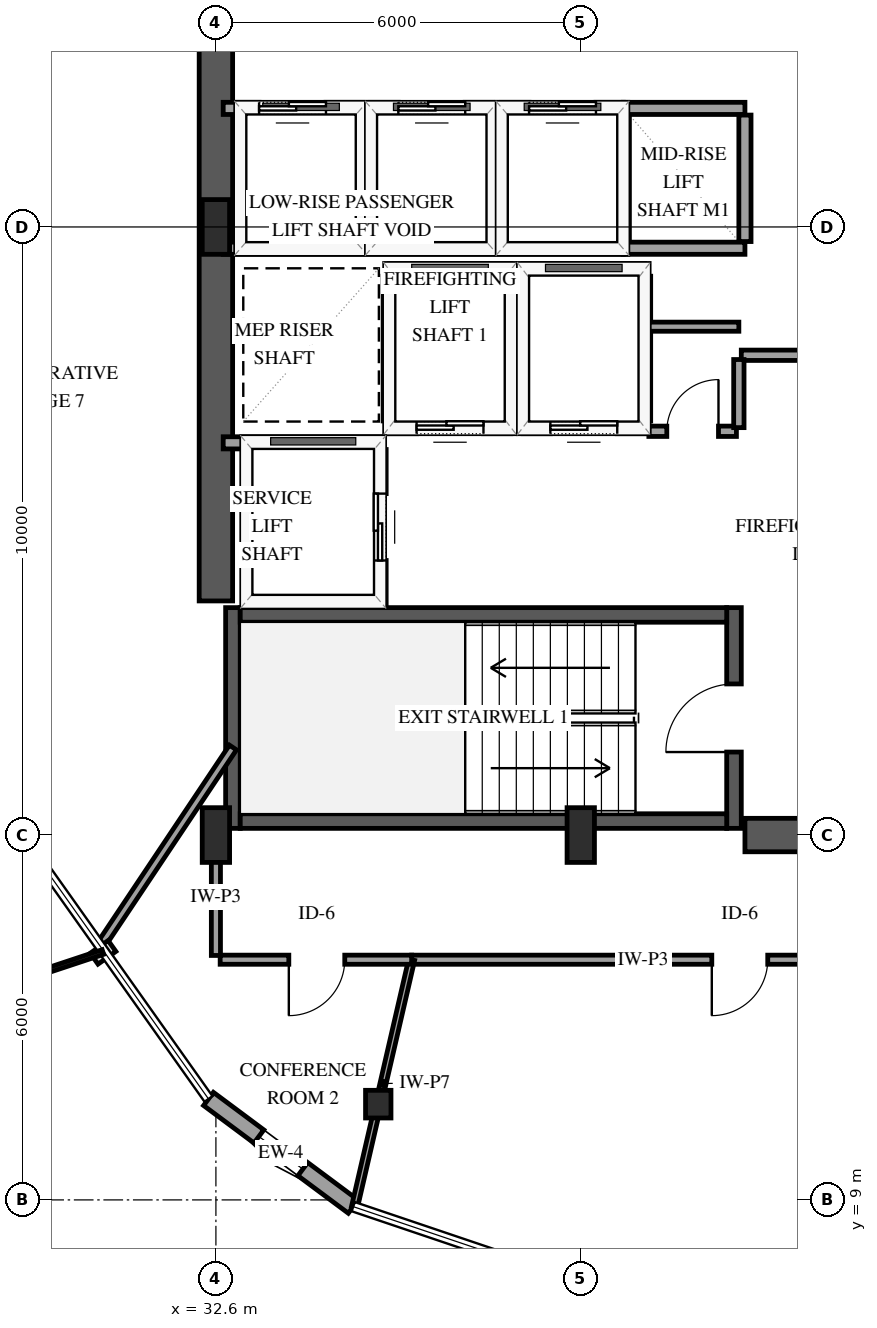
"""IFC4 building model, lengths in metres.
Left out: names, types, materials, properties, quantities, classifications, styles, units other than length and angle.
Written with IfcOpenShell. Run it as: python <this file> out.ifc"""

import sys

from ifc_helpers import new_model, si_unit, direction, frame, frame_2d, origin, origin_2d, place, context, subcontext, project, spatial, rectangle, i_section, extrude, element, fill, save


model = new_model("IFC4")
c1 = context("Model", 3, precision=1e-05, world=origin(), true_north=direction((0.0, 1.0)))
c2 = subcontext(c1, "Body", "Model", "MODEL_VIEW")
j1 = project(units=[si_unit("LENGTHUNIT", "METRE"), si_unit("PLANEANGLEUNIT", "RADIAN")], contexts=[c1])
p1 = place(None, origin())
s1 = spatial("IfcSite", under=j1, at=p1, CompositionType="ELEMENT")
p2 = place(p1, origin())
s2 = spatial("IfcBuilding", under=s1, at=p2, CompositionType="ELEMENT")
p3 = place(p2, frame((0.0, 0.0, 95.2)))
s3 = spatial("IfcBuildingStorey", under=s2, at=p3, CompositionType="ELEMENT", Elevation=95.2)
p4 = place(p3, frame((32.88, 15.11, 0.0), z_axis=(0.0, 0.0, 1.0), x_axis=(0.0, 1.0, 0.0)))
e1 = element("IfcWall", 1, at=p4, inside=s3, PredefinedType="SHEAR", context=c2, shape_type="SweptSolid", body=[
    extrude(rectangle(XDim=3.63, YDim=0.24, at=frame_2d((1.815, 0.0))), origin(), (0.0, 0.0, 1.0), 3.9),
])
p5 = place(p3, frame((41.12, 15.11, 0.0), z_axis=(0.0, 0.0, 1.0), x_axis=(0.0, 1.0, 0.0)))
e2 = element("IfcWall", 2, at=p5, inside=s3, PredefinedType="SHEAR", context=c2, shape_type="SweptSolid", body=[
    extrude(rectangle(XDim=3.63, YDim=0.24, at=frame_2d((1.815, 0.0))), origin(), (0.0, 0.0, 1.0), 3.9),
])
p6 = place(p5, frame((1.255, 0.0, 0.0)))
e3 = element("IfcOpeningElement", 3, at=p6, cuts=e2, PredefinedType="OPENING", context=c2, shape_type="SweptSolid", body=[
    extrude(rectangle(XDim=1.12, YDim=2.15, at=frame_2d((0.56, 1.075))), frame((0.0, 0.13, 0.0), z_axis=(0.0, -1.0, 0.0), x_axis=(1.0, 0.0, 0.0)), (0.0, 0.0, 1.0), 0.26),
])
for number, where, z_axis, x_axis in (
    (4, (33.0, 15.23, 0.0), (0.0, 0.0, 1.0), (1.0, 0.0, 0.0)),
    (5, (33.0, 18.62, 0.0), (0.0, 0.0, 1.0), (1.0, 0.0, 0.0)),
):
    element("IfcWall", number, at=place(p3, frame(where, z_axis=z_axis, x_axis=x_axis)), inside=s3, PredefinedType="SHEAR", context=c2, shape_type="SweptSolid", body=[
        extrude(rectangle(XDim=8.0, YDim=0.24, at=frame_2d((4.0, 0.0))), origin(), (0.0, 0.0, 1.0), 3.9),
    ])
p7 = place(p3, frame((32.6, 18.85, 0.0), z_axis=(0.0, 0.0, 1.0), x_axis=(0.0, 1.0, 0.0)))
e6 = element("IfcWall", 6, at=p7, inside=s3, PredefinedType="SHEAR", context=c2, shape_type="SweptSolid", body=[
    extrude(rectangle(XDim=12.3, YDim=0.55, at=frame_2d((6.15, 0.0))), origin(), (0.0, 0.0, 1.0), 3.9),
])
p8 = place(p3, frame((41.3, 15.0, 0.0), z_axis=(0.0, 0.0, 1.0), x_axis=(1.0, 0.0, 0.0)))
e7 = element("IfcWall", 7, at=p8, inside=s3, PredefinedType="SHEAR", context=c2, shape_type="SweptSolid", body=[
    extrude(rectangle(XDim=2.85, YDim=0.55, at=frame_2d((1.425, 0.0))), origin(), (0.0, 0.0, 1.0), 3.9),
])
for number, where, z_axis, x_axis in (
    (8, (32.6, 15.0, 0.0), (0.0, 0.0, 1.0), (1.0, 0.0, 0.0)),
    (9, (32.6, 25.0, 0.0), (0.0, 0.0, 1.0), (1.0, 0.0, 0.0)),
    (10, (38.6, 15.0, 0.0), (0.0, 0.0, 1.0), (1.0, 0.0, 0.0)),
):
    element("IfcColumn", number, at=place(p3, frame(where, z_axis=z_axis, x_axis=x_axis)), inside=s3, PredefinedType="PILASTER", context=c2, shape_type="SweptSolid", body=[
        extrude(rectangle(XDim=0.45, YDim=0.9, at=origin_2d()), origin(), (0.0, 0.0, 1.0), 3.9),
    ])
p9 = place(p3, frame((35.27, 10.575, 0.0), z_axis=(0.0, 0.0, 1.0), x_axis=(1.0, 0.0, 0.0)))
e11 = element("IfcColumn", 11, at=p9, inside=s3, PredefinedType="COLUMN", context=c2, shape_type="SweptSolid", body=[
    extrude(i_section(OverallWidth=0.418, OverallDepth=0.455, WebThickness=0.042, FlangeThickness=0.068, FilletRadius=0.038, at=origin_2d()), origin(), (0.0, 0.0, 1.0), 3.9),
])
p10 = place(p3, frame((32.478, 10.66, 0.0), z_axis=(0.0, 0.0, 1.0), x_axis=(0.802216720069, -0.597032942175, 0.0)))
e12 = element("IfcWall", 12, at=p10, inside=s3, PredefinedType="SOLIDWALL", context=c2, shape_type="SweptSolid", body=[
    extrude(rectangle(XDim=2.966, YDim=0.27, at=frame_2d((1.483, 0.0))), origin(), (0.0, 0.0, 1.0), 2.979),
])
p11 = place(p10, frame((1.033, 0.0, 0.75)))
e13 = element("IfcOpeningElement", 13, at=p11, cuts=e12, PredefinedType="OPENING", context=c2, shape_type="SweptSolid", body=[
    extrude(rectangle(XDim=0.9, YDim=1.5, at=frame_2d((0.45, 0.75))), frame((0.0, 0.145, 0.0), z_axis=(0.0, -1.0, 0.0), x_axis=(1.0, 0.0, 0.0)), (0.0, 0.0, 1.0), 0.29),
])
p12 = place(p3, frame((35.45, 21.7, 0.0), z_axis=(0.0, 0.0, 1.0), x_axis=(1.0, 0.0, 0.0)))
e14 = element("IfcWall", 14, at=p12, inside=s3, PredefinedType="SOLIDWALL", context=c2, shape_type="SweptSolid", body=[
    extrude(rectangle(XDim=2.0, YDim=0.2, at=frame_2d((1.0, 0.0))), origin(), (0.0, 0.0, 1.0), 3.6),
])
p13 = place(p12, frame((0.45, 0.0, 0.0)))
e15 = element("IfcOpeningElement", 15, at=p13, cuts=e14, PredefinedType="OPENING", context=c2, shape_type="SweptSolid", body=[
    extrude(rectangle(XDim=1.1, YDim=2.15, at=frame_2d((0.55, 1.075))), frame((0.0, 0.11, 0.0), z_axis=(0.0, -1.0, 0.0), x_axis=(1.0, 0.0, 0.0)), (0.0, 0.0, 1.0), 0.22),
])
p14 = place(p3, frame((35.45, 24.3, 0.0), z_axis=(0.0, 0.0, 1.0), x_axis=(1.0, 0.0, 0.0)))
e16 = element("IfcWall", 16, at=p14, inside=s3, PredefinedType="SOLIDWALL", context=c2, shape_type="SweptSolid", body=[
    extrude(rectangle(XDim=2.0, YDim=0.2, at=frame_2d((1.0, 0.0))), origin(), (0.0, 0.0, 1.0), 3.6),
])
for number, where, z_axis, x_axis in (
    (17, (35.45, 21.81, 0.0), (0.0, 0.0, 1.0), (0.0, 1.0, 0.0)),
    (18, (37.45, 21.81, 0.0), (0.0, 0.0, 1.0), (0.0, 1.0, 0.0)),
):
    element("IfcWall", number, at=place(p3, frame(where, z_axis=z_axis, x_axis=x_axis)), inside=s3, PredefinedType="SOLIDWALL", context=c2, shape_type="SweptSolid", body=[
        extrude(rectangle(XDim=2.38, YDim=0.2, at=frame_2d((1.19, 0.0))), origin(), (0.0, 0.0, 1.0), 3.6),
    ])
p15 = place(p3, frame((37.65, 21.7, 0.0), z_axis=(0.0, 0.0, 1.0), x_axis=(1.0, 0.0, 0.0)))
e19 = element("IfcWall", 19, at=p15, inside=s3, PredefinedType="SOLIDWALL", context=c2, shape_type="SweptSolid", body=[
    extrude(rectangle(XDim=2.0, YDim=0.2, at=frame_2d((1.0, 0.0))), origin(), (0.0, 0.0, 1.0), 3.6),
])
p16 = place(p15, frame((0.45, 0.0, 0.0)))
e20 = element("IfcOpeningElement", 20, at=p16, cuts=e19, PredefinedType="OPENING", context=c2, shape_type="SweptSolid", body=[
    extrude(rectangle(XDim=1.1, YDim=2.15, at=frame_2d((0.55, 1.075))), frame((0.0, 0.11, 0.0), z_axis=(0.0, -1.0, 0.0), x_axis=(1.0, 0.0, 0.0)), (0.0, 0.0, 1.0), 0.22),
])
p17 = place(p3, frame((37.65, 24.3, 0.0), z_axis=(0.0, 0.0, 1.0), x_axis=(1.0, 0.0, 0.0)))
e21 = element("IfcWall", 21, at=p17, inside=s3, PredefinedType="SOLIDWALL", context=c2, shape_type="SweptSolid", body=[
    extrude(rectangle(XDim=2.0, YDim=0.2, at=frame_2d((1.0, 0.0))), origin(), (0.0, 0.0, 1.0), 3.6),
])
p18 = place(p3, frame((39.65, 21.81, 0.0), z_axis=(0.0, 0.0, 1.0), x_axis=(0.0, 1.0, 0.0)))
e22 = element("IfcWall", 22, at=p18, inside=s3, PredefinedType="SOLIDWALL", context=c2, shape_type="SweptSolid", body=[
    extrude(rectangle(XDim=2.38, YDim=0.2, at=frame_2d((1.19, 0.0))), origin(), (0.0, 0.0, 1.0), 3.6),
])
p19 = place(p3, frame((32.72, 21.45, 0.0), z_axis=(0.0, 0.0, 1.0), x_axis=(1.0, 0.0, 0.0)))
e23 = element("IfcWall", 23, at=p19, inside=s3, PredefinedType="SOLIDWALL", context=c2, shape_type="SweptSolid", body=[
    extrude(rectangle(XDim=2.58, YDim=0.2, at=frame_2d((1.29, 0.0))), origin(), (0.0, 0.0, 1.0), 3.6),
])
p20 = place(p3, frame((35.3, 18.79, 0.0), z_axis=(0.0, 0.0, 1.0), x_axis=(0.0, 1.0, 0.0)))
e24 = element("IfcWall", 24, at=p20, inside=s3, PredefinedType="SOLIDWALL", context=c2, shape_type="SweptSolid", body=[
    extrude(rectangle(XDim=2.55, YDim=0.2, at=frame_2d((1.275, 0.0))), origin(), (0.0, 0.0, 1.0), 3.6),
])
p21 = place(p20, frame((0.725, 0.0, 0.0)))
e25 = element("IfcOpeningElement", 25, at=p21, cuts=e24, PredefinedType="OPENING", context=c2, shape_type="SweptSolid", body=[
    extrude(rectangle(XDim=1.1, YDim=2.15, at=frame_2d((0.55, 1.075))), frame((0.0, 0.11, 0.0), z_axis=(0.0, -1.0, 0.0), x_axis=(1.0, 0.0, 0.0)), (0.0, 0.0, 1.0), 0.22),
])
p22 = place(p3, frame((32.72, 24.65, 0.0), z_axis=(0.0, 0.0, 1.0), x_axis=(1.0, 0.0, 0.0)))
e26 = element("IfcWall", 26, at=p22, inside=s3, PredefinedType="SOLIDWALL", context=c2, shape_type="SweptSolid", body=[
    extrude(rectangle(XDim=2.28, YDim=0.2, at=frame_2d((1.14, 0.0))), origin(), (0.0, 0.0, 1.0), 3.6),
])
p23 = place(p3, frame((32.72, 26.95, 0.0), z_axis=(0.0, 0.0, 1.0), x_axis=(1.0, 0.0, 0.0)))
e27 = element("IfcWall", 27, at=p23, inside=s3, PredefinedType="SOLIDWALL", context=c2, shape_type="SweptSolid", body=[
    extrude(rectangle(XDim=2.28, YDim=0.2, at=frame_2d((1.14, 0.0))), origin(), (0.0, 0.0, 1.0), 3.6),
])
p24 = place(p23, frame((0.59, 0.0, 0.0)))
e28 = element("IfcOpeningElement", 28, at=p24, cuts=e27, PredefinedType="OPENING", context=c2, shape_type="SweptSolid", body=[
    extrude(rectangle(XDim=1.1, YDim=2.15, at=frame_2d((0.55, 1.075))), frame((0.0, 0.11, 0.0), z_axis=(0.0, -1.0, 0.0), x_axis=(1.0, 0.0, 0.0)), (0.0, 0.0, 1.0), 0.22),
])
p25 = place(p3, frame((35.0, 24.76, 0.0), z_axis=(0.0, 0.0, 1.0), x_axis=(0.0, 1.0, 0.0)))
e29 = element("IfcWall", 29, at=p25, inside=s3, PredefinedType="SOLIDWALL", context=c2, shape_type="SweptSolid", body=[
    extrude(rectangle(XDim=2.08, YDim=0.2, at=frame_2d((1.04, 0.0))), origin(), (0.0, 0.0, 1.0), 3.6),
])
p26 = place(p3, frame((35.15, 24.65, 0.0), z_axis=(0.0, 0.0, 1.0), x_axis=(1.0, 0.0, 0.0)))
e30 = element("IfcWall", 30, at=p26, inside=s3, PredefinedType="SOLIDWALL", context=c2, shape_type="SweptSolid", body=[
    extrude(rectangle(XDim=2.0, YDim=0.2, at=frame_2d((1.0, 0.0))), origin(), (0.0, 0.0, 1.0), 3.6),
])
p27 = place(p3, frame((35.15, 26.95, 0.0), z_axis=(0.0, 0.0, 1.0), x_axis=(1.0, 0.0, 0.0)))
e31 = element("IfcWall", 31, at=p27, inside=s3, PredefinedType="SOLIDWALL", context=c2, shape_type="SweptSolid", body=[
    extrude(rectangle(XDim=2.0, YDim=0.2, at=frame_2d((1.0, 0.0))), origin(), (0.0, 0.0, 1.0), 3.6),
])
p28 = place(p27, frame((0.45, 0.0, 0.0)))
e32 = element("IfcOpeningElement", 32, at=p28, cuts=e31, PredefinedType="OPENING", context=c2, shape_type="SweptSolid", body=[
    extrude(rectangle(XDim=1.1, YDim=2.15, at=frame_2d((0.55, 1.075))), frame((0.0, 0.11, 0.0), z_axis=(0.0, -1.0, 0.0), x_axis=(1.0, 0.0, 0.0)), (0.0, 0.0, 1.0), 0.22),
])
p29 = place(p3, frame((37.15, 24.76, 0.0), z_axis=(0.0, 0.0, 1.0), x_axis=(0.0, 1.0, 0.0)))
e33 = element("IfcWall", 33, at=p29, inside=s3, PredefinedType="SOLIDWALL", context=c2, shape_type="SweptSolid", body=[
    extrude(rectangle(XDim=2.08, YDim=0.2, at=frame_2d((1.04, 0.0))), origin(), (0.0, 0.0, 1.0), 3.6),
])
p30 = place(p3, frame((37.3, 24.65, 0.0), z_axis=(0.0, 0.0, 1.0), x_axis=(1.0, 0.0, 0.0)))
e34 = element("IfcWall", 34, at=p30, inside=s3, PredefinedType="SOLIDWALL", context=c2, shape_type="SweptSolid", body=[
    extrude(rectangle(XDim=2.0, YDim=0.2, at=frame_2d((1.0, 0.0))), origin(), (0.0, 0.0, 1.0), 3.6),
])
p31 = place(p3, frame((37.3, 26.95, 0.0), z_axis=(0.0, 0.0, 1.0), x_axis=(1.0, 0.0, 0.0)))
e35 = element("IfcWall", 35, at=p31, inside=s3, PredefinedType="SOLIDWALL", context=c2, shape_type="SweptSolid", body=[
    extrude(rectangle(XDim=2.0, YDim=0.2, at=frame_2d((1.0, 0.0))), origin(), (0.0, 0.0, 1.0), 3.6),
])
p32 = place(p31, frame((0.45, 0.0, 0.0)))
e36 = element("IfcOpeningElement", 36, at=p32, cuts=e35, PredefinedType="OPENING", context=c2, shape_type="SweptSolid", body=[
    extrude(rectangle(XDim=1.1, YDim=2.15, at=frame_2d((0.55, 1.075))), frame((0.0, 0.11, 0.0), z_axis=(0.0, -1.0, 0.0), x_axis=(1.0, 0.0, 0.0)), (0.0, 0.0, 1.0), 0.22),
])
p33 = place(p3, frame((39.3, 24.76, 0.0), z_axis=(0.0, 0.0, 1.0), x_axis=(0.0, 1.0, 0.0)))
e37 = element("IfcWall", 37, at=p33, inside=s3, PredefinedType="SOLIDWALL", context=c2, shape_type="SweptSolid", body=[
    extrude(rectangle(XDim=2.08, YDim=0.2, at=frame_2d((1.04, 0.0))), origin(), (0.0, 0.0, 1.0), 3.6),
])
for number, where, z_axis, x_axis in (
    (38, (39.3, 24.65, 0.0), (0.0, 0.0, 1.0), (1.0, 0.0, 0.0)),
    (39, (39.3, 26.95, 0.0), (0.0, 0.0, 1.0), (1.0, 0.0, 0.0)),
):
    element("IfcWall", number, at=place(p3, frame(where, z_axis=z_axis, x_axis=x_axis)), inside=s3, PredefinedType="SOLIDWALL", context=c2, shape_type="SweptSolid", body=[
        extrude(rectangle(XDim=2.0, YDim=0.2, at=frame_2d((1.0, 0.0))), origin(), (0.0, 0.0, 1.0), 3.6),
    ])
p34 = place(p3, frame((41.3, 24.76, 0.0), z_axis=(0.0, 0.0, 1.0), x_axis=(0.0, 1.0, 0.0)))
e40 = element("IfcWall", 40, at=p34, inside=s3, PredefinedType="SOLIDWALL", context=c2, shape_type="SweptSolid", body=[
    extrude(rectangle(XDim=2.08, YDim=0.2, at=frame_2d((1.04, 0.0))), origin(), (0.0, 0.0, 1.0), 3.6),
])
p35 = place(p3, frame((46.58, 12.95, 0.0), z_axis=(0.0, 0.0, 1.0), x_axis=(-1.0, 0.0, 0.0)))
e41 = element("IfcWall", 41, at=p35, inside=s3, PredefinedType="PARTITIONING", context=c2, shape_type="SweptSolid", body=[
    extrude(rectangle(XDim=10.761, YDim=0.15, at=frame_2d((5.38, 0.0))), origin(), (0.0, 0.0, 1.0), 3.6),
])
p36 = place(p35, frame((4.905, 0.0, 0.0)))
e42 = element("IfcOpeningElement", 42, at=p36, cuts=e41, PredefinedType="OPENING", context=c2, shape_type="SweptSolid", body=[
    extrude(rectangle(XDim=0.92, YDim=2.12, at=frame_2d((0.46, 1.06))), frame((0.0, 0.085, 0.0), z_axis=(0.0, -1.0, 0.0), x_axis=(1.0, 0.0, 0.0)), (0.0, 0.0, 1.0), 0.17),
])
p37 = place(p3, frame((35.819, 12.95, 0.0), z_axis=(0.0, 0.0, 1.0), x_axis=(-0.225188335262, -0.974315253736, 0.0)))
e43 = element("IfcWall", 43, at=p37, inside=s3, PredefinedType="PARTITIONING", context=c2, shape_type="SweptSolid", body=[
    extrude(rectangle(XDim=4.175, YDim=0.1, at=frame_2d((2.087, 0.0))), origin(), (0.0, 0.0, 1.0), 2.895),
])
p38 = place(p3, frame((32.88, 16.44, 0.0), z_axis=(0.0, 0.0, 1.0), x_axis=(-0.555574599571, -0.83146669465, 0.0)))
e44 = element("IfcWall", 44, at=p38, inside=s3, PredefinedType="PARTITIONING", context=c2, shape_type="SweptSolid", body=[
    extrude(rectangle(XDim=3.929, YDim=0.14, at=frame_2d((1.964, 0.0))), origin(), (0.0, 0.0, 1.0), 3.6),
])
p39 = place(p3, frame((41.24, 22.89, 0.0), z_axis=(0.0, 0.0, 1.0), x_axis=(1.0, 0.0, 0.0)))
e45 = element("IfcWall", 45, at=p39, inside=s3, PredefinedType="PARTITIONING", context=c2, shape_type="SweptSolid", body=[
    extrude(rectangle(XDim=3.32, YDim=0.17, at=frame_2d((1.66, 0.0))), origin(), (0.0, 0.0, 1.0), 3.6),
])
p40 = place(p39, frame((1.12, 0.0, 0.0)))
e46 = element("IfcOpeningElement", 46, at=p40, cuts=e45, PredefinedType="OPENING", context=c2, shape_type="SweptSolid", body=[
    extrude(rectangle(XDim=1.08, YDim=2.15, at=frame_2d((0.54, 1.075))), frame((0.0, 0.095, 0.0), z_axis=(0.0, -1.0, 0.0), x_axis=(1.0, 0.0, 0.0)), (0.0, 0.0, 1.0), 0.19),
])
p41 = place(p3, frame((35.819, 12.95, 0.0), z_axis=(0.0, 0.0, 1.0), x_axis=(-1.0, 0.0, 0.0)))
e47 = element("IfcWall", 47, at=p41, inside=s3, PredefinedType="PARTITIONING", context=c2, shape_type="SweptSolid", body=[
    extrude(rectangle(XDim=3.149, YDim=0.15, at=frame_2d((1.575, 0.0))), origin(), (0.0, 0.0, 1.0), 3.6),
])
p42 = place(p41, frame((1.1, 0.0, 0.0)))
e48 = element("IfcOpeningElement", 48, at=p42, cuts=e47, PredefinedType="OPENING", context=c2, shape_type="SweptSolid", body=[
    extrude(rectangle(XDim=0.92, YDim=2.12, at=frame_2d((0.46, 1.06))), frame((0.0, 0.085, 0.0), z_axis=(0.0, -1.0, 0.0), x_axis=(1.0, 0.0, 0.0)), (0.0, 0.0, 1.0), 0.17),
])
p43 = place(p3, frame((32.6, 13.02, 0.0), z_axis=(0.0, 0.0, 1.0), x_axis=(0.0, 1.0, 0.0)))
e49 = element("IfcWall", 49, at=p43, inside=s3, PredefinedType="PARTITIONING", context=c2, shape_type="SweptSolid", body=[
    extrude(rectangle(XDim=1.91, YDim=0.15, at=frame_2d((0.955, 0.0))), origin(), (0.0, 0.0, 1.0), 3.6),
])
p44 = place(p3, frame((39.72, 21.64, 0.0), z_axis=(0.0, 0.0, 1.0), x_axis=(1.0, 0.0, 0.0)))
e50 = element("IfcWall", 50, at=p44, inside=s3, PredefinedType="PARTITIONING", context=c2, shape_type="SweptSolid", body=[
    extrude(rectangle(XDim=1.44, YDim=0.17, at=frame_2d((0.72, 0.0))), origin(), (0.0, 0.0, 1.0), 3.6),
])
p45 = place(p44, frame((0.295, 0.0, 0.0)))
e51 = element("IfcOpeningElement", 51, at=p45, cuts=e50, PredefinedType="OPENING", context=c2, shape_type="SweptSolid", body=[
    extrude(rectangle(XDim=0.85, YDim=2.1, at=frame_2d((0.425, 1.05))), frame((0.0, 0.095, 0.0), z_axis=(0.0, -1.0, 0.0), x_axis=(1.0, 0.0, 0.0)), (0.0, 0.0, 1.0), 0.19),
])
p46 = place(p3, frame((41.2, 21.7, 0.0), z_axis=(0.0, 0.0, 1.0), x_axis=(0.0, 1.0, 0.0)))
e52 = element("IfcWall", 52, at=p46, inside=s3, PredefinedType="PARTITIONING", context=c2, shape_type="SweptSolid", body=[
    extrude(rectangle(XDim=1.12, YDim=0.17, at=frame_2d((0.56, 0.0))), origin(), (0.0, 0.0, 1.0), 3.6),
])
p47 = place(p3, frame((41.2, 23.36, 0.0), z_axis=(0.0, 0.0, 1.0), x_axis=(-1.0, 0.0, 0.0)))
e53 = element("IfcWall", 53, at=p47, inside=s3, PredefinedType="PARTITIONING", context=c2, shape_type="SweptSolid", body=[
    extrude(rectangle(XDim=1.48, YDim=0.15, at=frame_2d((0.74, 0.0))), origin(), (0.0, 0.0, 1.0), 3.6),
])
p48 = place(p11, origin())
e54 = element("IfcWindow", 54, at=p48, inside=s3, PartitioningType="SINGLE_PANEL", PredefinedType="WINDOW", context=c2, shape_type="SweptSolid", body=[
    extrude(rectangle(XDim=0.9, YDim=1.5, at=frame_2d((0.45, 0.75))), frame((0.0, 0.03, 0.0), z_axis=(0.0, -1.0, 0.0), x_axis=(1.0, 0.0, 0.0)), (0.0, 0.0, 1.0), 0.06),
])
fill(e13, e54)
p49 = place(p13, origin())
e55 = element("IfcDoor", 55, at=p49, inside=s3, OperationType="SLIDING_TO_LEFT", PredefinedType="DOOR", context=c2, shape_type="SweptSolid", body=[
    extrude(rectangle(XDim=1.1, YDim=2.15, at=frame_2d((0.55, 1.075))), frame((0.0, 0.025, 0.0), z_axis=(0.0, -1.0, 0.0), x_axis=(1.0, 0.0, 0.0)), (0.0, 0.0, 1.0), 0.05),
])
fill(e15, e55)
p50 = place(p16, origin())
e56 = element("IfcDoor", 56, at=p50, inside=s3, OperationType="SLIDING_TO_LEFT", PredefinedType="DOOR", context=c2, shape_type="SweptSolid", body=[
    extrude(rectangle(XDim=1.1, YDim=2.15, at=frame_2d((0.55, 1.075))), frame((0.0, 0.025, 0.0), z_axis=(0.0, -1.0, 0.0), x_axis=(1.0, 0.0, 0.0)), (0.0, 0.0, 1.0), 0.05),
])
fill(e20, e56)
p51 = place(p21, origin())
e57 = element("IfcDoor", 57, at=p51, inside=s3, OperationType="SLIDING_TO_LEFT", PredefinedType="DOOR", context=c2, shape_type="SweptSolid", body=[
    extrude(rectangle(XDim=1.1, YDim=2.15, at=frame_2d((0.55, 1.075))), frame((0.0, 0.025, 0.0), z_axis=(0.0, -1.0, 0.0), x_axis=(1.0, 0.0, 0.0)), (0.0, 0.0, 1.0), 0.05),
])
fill(e25, e57)
p52 = place(p24, origin())
e58 = element("IfcDoor", 58, at=p52, inside=s3, OperationType="SLIDING_TO_LEFT", PredefinedType="DOOR", context=c2, shape_type="SweptSolid", body=[
    extrude(rectangle(XDim=1.1, YDim=2.15, at=frame_2d((0.55, 1.075))), frame((0.0, 0.025, 0.0), z_axis=(0.0, -1.0, 0.0), x_axis=(1.0, 0.0, 0.0)), (0.0, 0.0, 1.0), 0.05),
])
fill(e28, e58)
p53 = place(p28, origin())
e59 = element("IfcDoor", 59, at=p53, inside=s3, OperationType="SLIDING_TO_LEFT", PredefinedType="DOOR", context=c2, shape_type="SweptSolid", body=[
    extrude(rectangle(XDim=1.1, YDim=2.15, at=frame_2d((0.55, 1.075))), frame((0.0, 0.025, 0.0), z_axis=(0.0, -1.0, 0.0), x_axis=(1.0, 0.0, 0.0)), (0.0, 0.0, 1.0), 0.05),
])
fill(e32, e59)
p54 = place(p32, origin())
e60 = element("IfcDoor", 60, at=p54, inside=s3, OperationType="SLIDING_TO_LEFT", PredefinedType="DOOR", context=c2, shape_type="SweptSolid", body=[
    extrude(rectangle(XDim=1.1, YDim=2.15, at=frame_2d((0.55, 1.075))), frame((0.0, 0.025, 0.0), z_axis=(0.0, -1.0, 0.0), x_axis=(1.0, 0.0, 0.0)), (0.0, 0.0, 1.0), 0.05),
])
fill(e36, e60)
p55 = place(p6, origin())
e61 = element("IfcDoor", 61, at=p55, inside=s3, OperationType="SINGLE_SWING_LEFT", PredefinedType="DOOR", context=c2, shape_type="SweptSolid", body=[
    extrude(rectangle(XDim=1.12, YDim=2.15, at=frame_2d((0.56, 1.075))), frame((0.0, 0.025, 0.0), z_axis=(0.0, -1.0, 0.0), x_axis=(1.0, 0.0, 0.0)), (0.0, 0.0, 1.0), 0.05),
])
fill(e3, e61)
p56 = place(p36, origin())
e62 = element("IfcDoor", 62, at=p56, inside=s3, OperationType="SINGLE_SWING_RIGHT", PredefinedType="DOOR", context=c2, shape_type="SweptSolid", body=[
    extrude(rectangle(XDim=0.92, YDim=2.12, at=frame_2d((0.46, 1.06))), frame((0.0, 0.025, 0.0), z_axis=(0.0, -1.0, 0.0), x_axis=(1.0, 0.0, 0.0)), (0.0, 0.0, 1.0), 0.05),
])
fill(e42, e62)
p57 = place(p42, origin())
e63 = element("IfcDoor", 63, at=p57, inside=s3, OperationType="SINGLE_SWING_RIGHT", PredefinedType="DOOR", context=c2, shape_type="SweptSolid", body=[
    extrude(rectangle(XDim=0.92, YDim=2.12, at=frame_2d((0.46, 1.06))), frame((0.0, 0.025, 0.0), z_axis=(0.0, -1.0, 0.0), x_axis=(1.0, 0.0, 0.0)), (0.0, 0.0, 1.0), 0.05),
])
fill(e48, e63)
p58 = place(p45, origin())
e64 = element("IfcDoor", 64, at=p58, inside=s3, OperationType="SINGLE_SWING_RIGHT", PredefinedType="DOOR", context=c2, shape_type="SweptSolid", body=[
    extrude(rectangle(XDim=0.85, YDim=2.1, at=frame_2d((0.425, 1.05))), frame((0.0, 0.025, 0.0), z_axis=(0.0, -1.0, 0.0), x_axis=(1.0, 0.0, 0.0)), (0.0, 0.0, 1.0), 0.05),
])
fill(e51, e64)
save(model, sys.argv[1])
